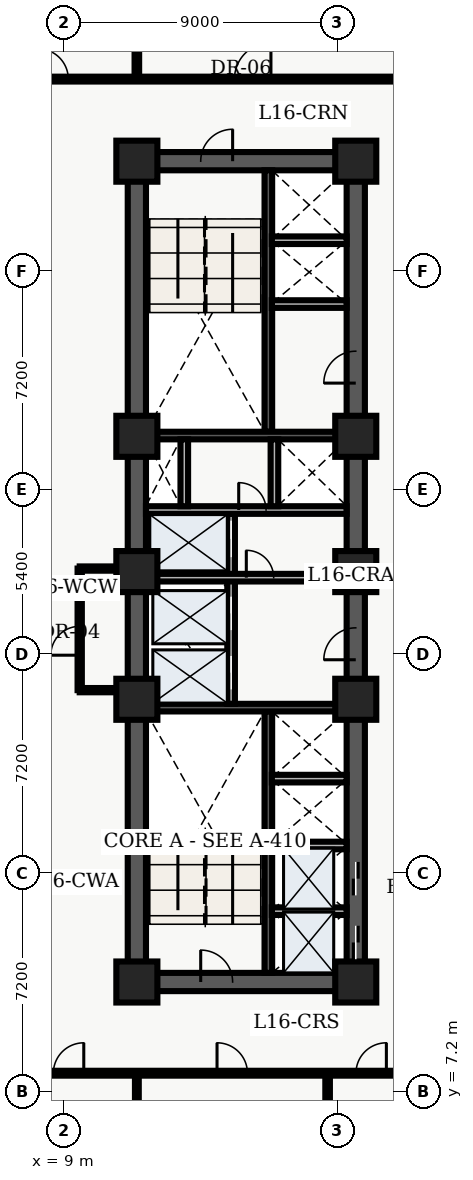
"""IFC4 building model, lengths in metres.
Left out: names, types, materials, properties, quantities, classifications, styles, units other than length and angle.
Written with IfcOpenShell. Run it as: python <this file> out.ifc"""

import sys

from ifc_helpers import new_model, entity, si_unit, converted_unit, direction, frame, origin_with_axes, origin_2d_with_axis, place, context, subcontext, project, spatial, polyline, rectangle, outline, extrude, element, fill, save


model = new_model("IFC4")
c1 = context("Model", 3, precision=1e-05, world=origin_with_axes(), true_north=direction((0.0, 1.0)))
c2 = subcontext(c1, "Body", "Model", "MODEL_VIEW")
j1 = project(units=[si_unit("LENGTHUNIT", "METRE"), converted_unit("PLANEANGLEUNIT", "DEGREE", entity("IfcPlaneAngleMeasure", 0.017), si_unit("PLANEANGLEUNIT", "RADIAN"), dimensions=[0, 0, 0, 0, 0, 0, 0])], contexts=[c1])
p1 = place(None, origin_with_axes())
s1 = spatial("IfcSite", under=j1, at=p1, CompositionType="ELEMENT")
p2 = place(p1, origin_with_axes())
s2 = spatial("IfcBuilding", under=s1, at=p2, CompositionType="ELEMENT")
p3 = place(p2, frame((0.0, 0.0, 67.8), z_axis=(0.0, 0.0, 1.0), x_axis=(1.0, 0.0, 0.0)))
s3 = spatial("IfcBuildingStorey", under=s2, at=p3, CompositionType="ELEMENT", Elevation=67.8)
p4 = place(p3, frame((11.4, 10.8, 0.0), z_axis=(0.0, 0.0, 1.0), x_axis=(0.0, 1.0, 0.0)))
e1 = element("IfcWall", 1, at=p4, inside=s3, PredefinedType="SHEAR", context=c2, shape_type="SweptSolid", body=[
    extrude(outline(polyline([(0.0, -0.3), (27.0, -0.3), (27.0, 0.3), (0.0, 0.3), (0.0, -0.3)])), origin_with_axes(), (0.0, 0.0, 1.0), 3.66),
])
p5 = place(p3, frame((11.4, 10.8, 0.0), z_axis=(0.0, 0.0, 1.0), x_axis=(1.0, 0.0, 0.0)))
e2 = element("IfcWall", 2, at=p5, inside=s3, PredefinedType="SHEAR", context=c2, shape_type="SweptSolid", body=[
    extrude(outline(polyline([(0.0, -0.3), (7.2, -0.3), (7.2, 0.3), (0.0, 0.3), (0.0, -0.3)])), origin_with_axes(), (0.0, 0.0, 1.0), 3.66),
])
p6 = place(p5, frame((2.625, 0.0, 0.0), z_axis=(0.0, 0.0, 1.0), x_axis=(1.0, 0.0, 0.0)))
e3 = element("IfcOpeningElement", 3, at=p6, cuts=e2, PredefinedType="OPENING", context=c2, shape_type="SweptSolid", body=[
    extrude(rectangle(XDim=1.05, YDim=0.62, at=origin_2d_with_axis()), origin_with_axes(), (0.0, 0.0, 1.0), 2.15),
])
p7 = place(p3, frame((11.4, 37.8, 0.0), z_axis=(0.0, 0.0, 1.0), x_axis=(1.0, 0.0, 0.0)))
e4 = element("IfcWall", 4, at=p7, inside=s3, PredefinedType="SHEAR", context=c2, shape_type="SweptSolid", body=[
    extrude(outline(polyline([(0.0, -0.3), (7.2, -0.3), (7.2, 0.3), (0.0, 0.3), (0.0, -0.3)])), origin_with_axes(), (0.0, 0.0, 1.0), 3.66),
])
p8 = place(p7, frame((2.625, 0.0, 0.0), z_axis=(0.0, 0.0, 1.0), x_axis=(1.0, 0.0, 0.0)))
e5 = element("IfcOpeningElement", 5, at=p8, cuts=e4, PredefinedType="OPENING", context=c2, shape_type="SweptSolid", body=[
    extrude(rectangle(XDim=1.05, YDim=0.62, at=origin_2d_with_axis()), origin_with_axes(), (0.0, 0.0, 1.0), 2.15),
])
p9 = place(p3, frame((18.6, 10.8, 0.0), z_axis=(0.0, 0.0, 1.0), x_axis=(0.0, 1.0, 0.0)))
e6 = element("IfcWall", 6, at=p9, inside=s3, PredefinedType="SHEAR", context=c2, shape_type="SweptSolid", body=[
    extrude(outline(polyline([(0.0, -0.3), (13.5, -0.3), (13.5, 0.3), (0.0, 0.3), (0.0, -0.3)])), origin_with_axes(), (0.0, 0.0, 1.0), 3.66),
])
p10 = place(p9, frame((1.3, 0.0, 0.0), z_axis=(0.0, 0.0, 1.0), x_axis=(1.0, 0.0, 0.0)))
e7 = element("IfcOpeningElement", 7, at=p10, cuts=e6, PredefinedType="OPENING", context=c2, shape_type="SweptSolid", body=[
    extrude(rectangle(XDim=1.1, YDim=0.62, at=origin_2d_with_axis()), origin_with_axes(), (0.0, 0.0, 1.0), 2.15),
])
p11 = place(p9, frame((3.4, 0.0, 0.0), z_axis=(0.0, 0.0, 1.0), x_axis=(1.0, 0.0, 0.0)))
e8 = element("IfcOpeningElement", 8, at=p11, cuts=e6, PredefinedType="OPENING", context=c2, shape_type="SweptSolid", body=[
    extrude(rectangle(XDim=1.1, YDim=0.62, at=origin_2d_with_axis()), origin_with_axes(), (0.0, 0.0, 1.0), 2.15),
])
p12 = place(p9, frame((11.125, 0.0, 0.0), z_axis=(0.0, 0.0, 1.0), x_axis=(1.0, 0.0, 0.0)))
e9 = element("IfcOpeningElement", 9, at=p12, cuts=e6, PredefinedType="OPENING", context=c2, shape_type="SweptSolid", body=[
    extrude(rectangle(XDim=1.05, YDim=0.62, at=origin_2d_with_axis()), origin_with_axes(), (0.0, 0.0, 1.0), 2.15),
])
p13 = place(p3, frame((18.6, 24.3, 0.0), z_axis=(0.0, 0.0, 1.0), x_axis=(0.0, 1.0, 0.0)))
e10 = element("IfcWall", 10, at=p13, inside=s3, PredefinedType="SHEAR", context=c2, shape_type="SweptSolid", body=[
    extrude(outline(polyline([(0.0, -0.3), (13.5, -0.3), (13.5, 0.3), (0.0, 0.3), (0.0, -0.3)])), origin_with_axes(), (0.0, 0.0, 1.0), 3.66),
])
p14 = place(p13, frame((6.725, 0.0, 0.0), z_axis=(0.0, 0.0, 1.0), x_axis=(1.0, 0.0, 0.0)))
e11 = element("IfcOpeningElement", 11, at=p14, cuts=e10, PredefinedType="OPENING", context=c2, shape_type="SweptSolid", body=[
    extrude(rectangle(XDim=1.05, YDim=0.62, at=origin_2d_with_axis()), origin_with_axes(), (0.0, 0.0, 1.0), 2.15),
])
p15 = place(p3, frame((15.725, 11.1, 0.0), z_axis=(0.0, 0.0, 1.0), x_axis=(0.0, 1.0, 0.0)))
e12 = element("IfcWall", 12, at=p15, inside=s3, PredefinedType="SHEAR", context=c2, shape_type="SweptSolid", body=[
    extrude(outline(polyline([(0.0, -0.125), (8.6, -0.125), (8.6, 0.125), (0.0, 0.125), (0.0, -0.125)])), origin_with_axes(), (0.0, 0.0, 1.0), 3.66),
])
p16 = place(p3, frame((11.7, 19.825, 0.0), z_axis=(0.0, 0.0, 1.0), x_axis=(1.0, 0.0, 0.0)))
e13 = element("IfcWall", 13, at=p16, inside=s3, PredefinedType="SHEAR", context=c2, shape_type="SweptSolid", body=[
    extrude(outline(polyline([(0.0, -0.125), (6.6, -0.125), (6.6, 0.125), (0.0, 0.125), (0.0, -0.125)])), origin_with_axes(), (0.0, 0.0, 1.0), 3.66),
])
p17 = place(p3, frame((15.725, 28.9, 0.0), z_axis=(0.0, 0.0, 1.0), x_axis=(0.0, 1.0, 0.0)))
e14 = element("IfcWall", 14, at=p17, inside=s3, PredefinedType="SHEAR", context=c2, shape_type="SweptSolid", body=[
    extrude(outline(polyline([(0.0, -0.125), (8.6, -0.125), (8.6, 0.125), (0.0, 0.125), (0.0, -0.125)])), origin_with_axes(), (0.0, 0.0, 1.0), 3.66),
])
p18 = place(p3, frame((11.7, 28.775, 0.0), z_axis=(0.0, 0.0, 1.0), x_axis=(1.0, 0.0, 0.0)))
e15 = element("IfcWall", 15, at=p18, inside=s3, PredefinedType="SHEAR", context=c2, shape_type="SweptSolid", body=[
    extrude(outline(polyline([(0.0, -0.125), (6.6, -0.125), (6.6, 0.125), (0.0, 0.125), (0.0, -0.125)])), origin_with_axes(), (0.0, 0.0, 1.0), 3.66),
])
p19 = place(p3, frame((14.5, 19.95, 0.0), z_axis=(0.0, 0.0, 1.0), x_axis=(0.0, 1.0, 0.0)))
e16 = element("IfcWall", 16, at=p19, inside=s3, PredefinedType="SOLIDWALL", context=c2, shape_type="SweptSolid", body=[
    extrude(outline(polyline([(0.0, -0.125), (6.25, -0.125), (6.25, 0.125), (0.0, 0.125), (0.0, -0.125)])), origin_with_axes(), (0.0, 0.0, 1.0), 2.7),
])
p20 = place(p19, frame((1.025, 0.0, 0.0), z_axis=(0.0, 0.0, 1.0), x_axis=(1.0, 0.0, 0.0)))
e17 = element("IfcOpeningElement", 17, at=p20, cuts=e16, PredefinedType="OPENING", context=c2, shape_type="SweptSolid", body=[
    extrude(rectangle(XDim=1.1, YDim=0.27, at=origin_2d_with_axis()), origin_with_axes(), (0.0, 0.0, 1.0), 2.15),
])
p21 = place(p19, frame((2.975, 0.0, 0.0), z_axis=(0.0, 0.0, 1.0), x_axis=(1.0, 0.0, 0.0)))
e18 = element("IfcOpeningElement", 18, at=p21, cuts=e16, PredefinedType="OPENING", context=c2, shape_type="SweptSolid", body=[
    extrude(rectangle(XDim=1.1, YDim=0.27, at=origin_2d_with_axis()), origin_with_axes(), (0.0, 0.0, 1.0), 2.15),
])
p22 = place(p19, frame((5.425, 0.0, 0.0), z_axis=(0.0, 0.0, 1.0), x_axis=(1.0, 0.0, 0.0)))
e19 = element("IfcOpeningElement", 19, at=p22, cuts=e16, PredefinedType="OPENING", context=c2, shape_type="SweptSolid", body=[
    extrude(rectangle(XDim=1.2, YDim=0.27, at=origin_2d_with_axis()), origin_with_axes(), (0.0, 0.0, 1.0), 2.15),
])
p23 = place(p3, frame((11.7, 24.1, 0.0), z_axis=(0.0, 0.0, 1.0), x_axis=(1.0, 0.0, 0.0)))
e20 = element("IfcWall", 20, at=p23, inside=s3, PredefinedType="SOLIDWALL", context=c2, shape_type="SweptSolid", body=[
    extrude(outline(polyline([(0.0, -0.125), (6.6, -0.125), (6.6, 0.125), (0.0, 0.125), (0.0, -0.125)])), origin_with_axes(), (0.0, 0.0, 1.0), 2.7),
])
p24 = place(p23, frame((3.75, 0.0, 0.0), z_axis=(0.0, 0.0, 1.0), x_axis=(1.0, 0.0, 0.0)))
e21 = element("IfcOpeningElement", 21, at=p24, cuts=e20, PredefinedType="OPENING", context=c2, shape_type="SweptSolid", body=[
    extrude(rectangle(XDim=0.9, YDim=0.27, at=origin_2d_with_axis()), origin_with_axes(), (0.0, 0.0, 1.0), 2.15),
])
p25 = place(p3, frame((11.7, 26.325, 0.0), z_axis=(0.0, 0.0, 1.0), x_axis=(1.0, 0.0, 0.0)))
e22 = element("IfcWall", 22, at=p25, inside=s3, PredefinedType="SOLIDWALL", context=c2, shape_type="SweptSolid", body=[
    extrude(outline(polyline([(0.0, -0.125), (6.6, -0.125), (6.6, 0.125), (0.0, 0.125), (0.0, -0.125)])), origin_with_axes(), (0.0, 0.0, 1.0), 2.7),
])
p26 = place(p25, frame((3.5, 0.0, 0.0), z_axis=(0.0, 0.0, 1.0), x_axis=(1.0, 0.0, 0.0)))
e23 = element("IfcOpeningElement", 23, at=p26, cuts=e22, PredefinedType="OPENING", context=c2, shape_type="SweptSolid", body=[
    extrude(rectangle(XDim=0.9, YDim=0.27, at=origin_2d_with_axis()), origin_with_axes(), (0.0, 0.0, 1.0), 2.15),
])
for number, where, z_axis, x_axis in (
    (24, (12.96, 26.45, 0.0), (0.0, 0.0, 1.0), (0.0, 1.0, 0.0)),
    (25, (15.925, 26.45, 0.0), (0.0, 0.0, 1.0), (0.0, 1.0, 0.0)),
):
    element("IfcWall", number, at=place(p3, frame(where, z_axis=z_axis, x_axis=x_axis)), inside=s3, PredefinedType="SOLIDWALL", context=c2, shape_type="SweptSolid", body=[
        extrude(outline(polyline([(0.0, -0.125), (2.2, -0.125), (2.2, 0.125), (0.0, 0.125), (0.0, -0.125)])), origin_with_axes(), (0.0, 0.0, 1.0), 2.7),
    ])
for number, where, z_axis, x_axis in (
    (26, (11.4, 10.8, 0.0), (0.0, 0.0, 1.0), (1.0, 0.0, 0.0)),
    (27, (11.4, 20.1, 0.0), (0.0, 0.0, 1.0), (1.0, 0.0, 0.0)),
    (28, (11.4, 24.3, 0.0), (0.0, 0.0, 1.0), (1.0, 0.0, 0.0)),
    (29, (11.4, 28.75, 0.0), (0.0, 0.0, 1.0), (1.0, 0.0, 0.0)),
    (30, (11.4, 37.8, 0.0), (0.0, 0.0, 1.0), (1.0, 0.0, 0.0)),
    (31, (18.6, 10.8, 0.0), (0.0, 0.0, 1.0), (1.0, 0.0, 0.0)),
    (32, (18.6, 20.1, 0.0), (0.0, 0.0, 1.0), (1.0, 0.0, 0.0)),
    (33, (18.6, 24.3, 0.0), (0.0, 0.0, 1.0), (1.0, 0.0, 0.0)),
    (34, (18.6, 28.75, 0.0), (0.0, 0.0, 1.0), (1.0, 0.0, 0.0)),
    (35, (18.6, 37.8, 0.0), (0.0, 0.0, 1.0), (1.0, 0.0, 0.0)),
):
    element("IfcColumn", number, at=place(p3, frame(where, z_axis=z_axis, x_axis=x_axis)), inside=s3, PredefinedType="COLUMN", context=c2, shape_type="SweptSolid", body=[
        extrude(rectangle(XDim=1.35, YDim=1.35, at=origin_2d_with_axis()), origin_with_axes(), (0.0, 0.0, 1.0), 3.9),
    ])
for number, where, z_axis, x_axis in (
    (36, (15.84, 13.13, 0.0), (0.0, 0.0, 1.0), (1.0, 0.0, 0.0)),
    (37, (15.84, 15.29, 0.0), (0.0, 0.0, 1.0), (1.0, 0.0, 0.0)),
    (38, (15.84, 17.49, 0.0), (0.0, 0.0, 1.0), (1.0, 0.0, 0.0)),
    (39, (15.84, 33.1, 0.0), (0.0, 0.0, 1.0), (1.0, 0.0, 0.0)),
    (40, (15.84, 35.2, 0.0), (0.0, 0.0, 1.0), (1.0, 0.0, 0.0)),
):
    element("IfcWall", number, at=place(p3, frame(where, z_axis=z_axis, x_axis=x_axis)), inside=s3, PredefinedType="SOLIDWALL", context=c2, shape_type="SweptSolid", body=[
        extrude(outline(polyline([(0.0, -0.125), (2.46, -0.125), (2.46, 0.125), (0.0, 0.125), (0.0, -0.125)])), origin_with_axes(), (0.0, 0.0, 1.0), 2.7),
    ])
p27 = place(p3, frame((9.52, 20.4, 0.0), z_axis=(0.0, 0.0, 1.0), x_axis=(0.0, 1.0, 0.0)))
e41 = element("IfcWall", 41, at=p27, inside=s3, PredefinedType="PARTITIONING", context=c2, shape_type="SweptSolid", body=[
    extrude(outline(polyline([(0.0, -0.07), (4.0, -0.07), (4.0, 0.07), (0.0, 0.07), (0.0, -0.07)])), origin_with_axes(), (0.0, 0.0, 1.0), 2.7),
])
p28 = place(p27, frame((1.625, 0.0, 0.0), z_axis=(0.0, 0.0, 1.0), x_axis=(1.0, 0.0, 0.0)))
e42 = element("IfcOpeningElement", 42, at=p28, cuts=e41, PredefinedType="OPENING", context=c2, shape_type="SweptSolid", body=[
    extrude(rectangle(XDim=0.95, YDim=0.16, at=origin_2d_with_axis()), origin_with_axes(), (0.0, 0.0, 1.0), 2.15),
])
for number, where, z_axis, x_axis in (
    (43, (9.52, 20.4, 0.0), (0.0, 0.0, 1.0), (1.0, 0.0, 0.0)),
    (44, (9.52, 24.4, 0.0), (0.0, 0.0, 1.0), (1.0, 0.0, 0.0)),
):
    element("IfcWall", number, at=place(p3, frame(where, z_axis=z_axis, x_axis=x_axis)), inside=s3, PredefinedType="PARTITIONING", context=c2, shape_type="SweptSolid", body=[
        extrude(outline(polyline([(0.0, -0.07), (1.58, -0.07), (1.58, 0.07), (0.0, 0.07), (0.0, -0.07)])), origin_with_axes(), (0.0, 0.0, 1.0), 2.7),
    ])
p29 = place(p3, frame((2.6, 7.8, 0.0), z_axis=(0.0, 0.0, 1.0), x_axis=(1.0, 0.0, 0.0)))
e45 = element("IfcWall", 45, at=p29, inside=s3, PredefinedType="PARTITIONING", context=c2, shape_type="SweptSolid", body=[
    extrude(outline(polyline([(0.0, -0.08), (18.55, -0.08), (18.55, 0.08), (0.0, 0.08), (0.0, -0.08)])), origin_with_axes(), (0.0, 0.0, 1.0), 2.7),
])
p30 = place(p29, frame((2.149, 0.0, 0.0), z_axis=(0.0, 0.0, 1.0), x_axis=(1.0, 0.0, 0.0)))
e46 = element("IfcOpeningElement", 46, at=p30, cuts=e45, PredefinedType="OPENING", context=c2, shape_type="SweptSolid", body=[
    extrude(rectangle(XDim=1.0, YDim=0.18, at=origin_2d_with_axis()), origin_with_axes(), (0.0, 0.0, 1.0), 2.15),
])
p31 = place(p29, frame((6.554, 0.0, 0.0), z_axis=(0.0, 0.0, 1.0), x_axis=(1.0, 0.0, 0.0)))
e47 = element("IfcOpeningElement", 47, at=p31, cuts=e45, PredefinedType="OPENING", context=c2, shape_type="SweptSolid", body=[
    extrude(rectangle(XDim=1.0, YDim=0.18, at=origin_2d_with_axis()), origin_with_axes(), (0.0, 0.0, 1.0), 2.15),
])
p32 = place(p29, frame((11.937, 0.0, 0.0), z_axis=(0.0, 0.0, 1.0), x_axis=(1.0, 0.0, 0.0)))
e48 = element("IfcOpeningElement", 48, at=p32, cuts=e45, PredefinedType="OPENING", context=c2, shape_type="SweptSolid", body=[
    extrude(rectangle(XDim=1.0, YDim=0.18, at=origin_2d_with_axis()), origin_with_axes(), (0.0, 0.0, 1.0), 2.15),
])
p33 = place(p29, frame((16.507, 0.0, 0.0), z_axis=(0.0, 0.0, 1.0), x_axis=(1.0, 0.0, 0.0)))
e49 = element("IfcOpeningElement", 49, at=p33, cuts=e45, PredefinedType="OPENING", context=c2, shape_type="SweptSolid", body=[
    extrude(rectangle(XDim=1.0, YDim=0.18, at=origin_2d_with_axis()), origin_with_axes(), (0.0, 0.0, 1.0), 2.15),
])
p34 = place(p3, frame((2.6, 40.5, 0.0), z_axis=(0.0, 0.0, 1.0), x_axis=(1.0, 0.0, 0.0)))
e50 = element("IfcWall", 50, at=p34, inside=s3, PredefinedType="PARTITIONING", context=c2, shape_type="SweptSolid", body=[
    extrude(outline(polyline([(0.0, -0.08), (18.65, -0.08), (18.65, 0.08), (0.0, 0.08), (0.0, -0.08)])), origin_with_axes(), (0.0, 0.0, 1.0), 2.7),
])
p35 = place(p34, frame((6.045, 0.0, 0.0), z_axis=(0.0, 0.0, 1.0), x_axis=(1.0, 0.0, 0.0)))
e51 = element("IfcOpeningElement", 51, at=p35, cuts=e50, PredefinedType="OPENING", context=c2, shape_type="SweptSolid", body=[
    extrude(rectangle(XDim=1.0, YDim=0.18, at=origin_2d_with_axis()), origin_with_axes(), (0.0, 0.0, 1.0), 2.15),
])
p36 = place(p34, frame((12.61, 0.0, 0.0), z_axis=(0.0, 0.0, 1.0), x_axis=(1.0, 0.0, 0.0)))
e52 = element("IfcOpeningElement", 52, at=p36, cuts=e50, PredefinedType="OPENING", context=c2, shape_type="SweptSolid", body=[
    extrude(rectangle(XDim=1.2, YDim=0.18, at=origin_2d_with_axis()), origin_with_axes(), (0.0, 0.0, 1.0), 2.2),
])
p37 = place(p3, frame((11.4, 0.36, 0.0), z_axis=(0.0, 0.0, 1.0), x_axis=(0.0, 1.0, 0.0)))
e53 = element("IfcWall", 53, at=p37, inside=s3, PredefinedType="PARTITIONING", context=c2, shape_type="SweptSolid", body=[
    extrude(outline(polyline([(0.0, -0.062), (7.34, -0.062), (7.34, 0.062), (0.0, 0.062), (0.0, -0.062)])), origin_with_axes(), (0.0, 0.0, 1.0), 2.7),
])
p38 = place(p3, frame((17.674, 0.36, 0.0), z_axis=(0.0, 0.0, 1.0), x_axis=(0.0, 1.0, 0.0)))
e54 = element("IfcWall", 54, at=p38, inside=s3, PredefinedType="PARTITIONING", context=c2, shape_type="SweptSolid", body=[
    extrude(outline(polyline([(0.0, -0.075), (7.34, -0.075), (7.34, 0.075), (0.0, 0.075), (0.0, -0.075)])), origin_with_axes(), (0.0, 0.0, 1.0), 2.7),
])
p39 = place(p3, frame((11.4, 40.6, 0.0), z_axis=(0.0, 0.0, 1.0), x_axis=(0.0, 1.0, 0.0)))
e55 = element("IfcWall", 55, at=p39, inside=s3, PredefinedType="PARTITIONING", context=c2, shape_type="SweptSolid", body=[
    extrude(outline(polyline([(0.0, -0.075), (7.64, -0.075), (7.64, 0.075), (0.0, 0.075), (0.0, -0.075)])), origin_with_axes(), (0.0, 0.0, 1.0), 2.7),
])
p40 = place(p9, frame((1.3, 0.0, 0.0), z_axis=(0.0, 0.0, 1.0), x_axis=(1.0, 0.0, 0.0)))
e56 = element("IfcDoor", 56, at=p40, inside=s3, OperationType="SLIDING_TO_LEFT", PredefinedType="DOOR", context=c2, shape_type="SweptSolid", body=[
    extrude(rectangle(XDim=1.1, YDim=0.09, at=origin_2d_with_axis()), origin_with_axes(), (0.0, 0.0, 1.0), 2.15),
])
fill(e7, e56)
p41 = place(p9, frame((3.4, 0.0, 0.0), z_axis=(0.0, 0.0, 1.0), x_axis=(1.0, 0.0, 0.0)))
e57 = element("IfcDoor", 57, at=p41, inside=s3, OperationType="SLIDING_TO_RIGHT", PredefinedType="DOOR", context=c2, shape_type="SweptSolid", body=[
    extrude(rectangle(XDim=1.1, YDim=0.09, at=origin_2d_with_axis()), origin_with_axes(), (0.0, 0.0, 1.0), 2.15),
])
fill(e8, e57)
p42 = place(p19, frame((1.025, 0.0, 0.0), z_axis=(0.0, 0.0, 1.0), x_axis=(1.0, 0.0, 0.0)))
e58 = element("IfcDoor", 58, at=p42, inside=s3, OperationType="SLIDING_TO_LEFT", PredefinedType="DOOR", context=c2, shape_type="SweptSolid", body=[
    extrude(rectangle(XDim=1.1, YDim=0.09, at=origin_2d_with_axis()), origin_with_axes(), (0.0, 0.0, 1.0), 2.15),
])
fill(e17, e58)
p43 = place(p19, frame((2.975, 0.0, 0.0), z_axis=(0.0, 0.0, 1.0), x_axis=(1.0, 0.0, 0.0)))
e59 = element("IfcDoor", 59, at=p43, inside=s3, OperationType="SLIDING_TO_RIGHT", PredefinedType="DOOR", context=c2, shape_type="SweptSolid", body=[
    extrude(rectangle(XDim=1.1, YDim=0.09, at=origin_2d_with_axis()), origin_with_axes(), (0.0, 0.0, 1.0), 2.15),
])
fill(e18, e59)
p44 = place(p19, frame((5.425, 0.0, 0.0), z_axis=(0.0, 0.0, 1.0), x_axis=(1.0, 0.0, 0.0)))
e60 = element("IfcDoor", 60, at=p44, inside=s3, OperationType="DOUBLE_DOOR_SLIDING", PredefinedType="DOOR", context=c2, shape_type="SweptSolid", body=[
    extrude(rectangle(XDim=1.2, YDim=0.09, at=origin_2d_with_axis()), origin_with_axes(), (0.0, 0.0, 1.0), 2.15),
])
fill(e19, e60)
p45 = place(p5, frame((2.625, 0.0, 0.0), z_axis=(0.0, 0.0, 1.0), x_axis=(1.0, 0.0, 0.0)))
e61 = element("IfcDoor", 61, at=p45, inside=s3, OperationType="SINGLE_SWING_LEFT", PredefinedType="DOOR", context=c2, shape_type="SweptSolid", body=[
    extrude(rectangle(XDim=1.05, YDim=0.09, at=origin_2d_with_axis()), origin_with_axes(), (0.0, 0.0, 1.0), 2.15),
])
fill(e3, e61)
p46 = place(p7, frame((2.625, 0.0, 0.0), z_axis=(0.0, 0.0, 1.0), x_axis=(1.0, 0.0, 0.0)))
e62 = element("IfcDoor", 62, at=p46, inside=s3, OperationType="SINGLE_SWING_RIGHT", PredefinedType="DOOR", context=c2, shape_type="SweptSolid", body=[
    extrude(rectangle(XDim=1.05, YDim=0.09, at=origin_2d_with_axis()), origin_with_axes(), (0.0, 0.0, 1.0), 2.15),
])
fill(e5, e62)
p47 = place(p9, frame((11.125, 0.0, 0.0), z_axis=(0.0, 0.0, 1.0), x_axis=(1.0, 0.0, 0.0)))
e63 = element("IfcDoor", 63, at=p47, inside=s3, OperationType="SINGLE_SWING_LEFT", PredefinedType="DOOR", context=c2, shape_type="SweptSolid", body=[
    extrude(rectangle(XDim=1.05, YDim=0.09, at=origin_2d_with_axis()), origin_with_axes(), (0.0, 0.0, 1.0), 2.15),
])
fill(e9, e63)
p48 = place(p23, frame((3.75, 0.0, 0.0), z_axis=(0.0, 0.0, 1.0), x_axis=(1.0, 0.0, 0.0)))
e64 = element("IfcDoor", 64, at=p48, inside=s3, OperationType="SINGLE_SWING_LEFT", PredefinedType="DOOR", context=c2, shape_type="SweptSolid", body=[
    extrude(rectangle(XDim=0.9, YDim=0.09, at=origin_2d_with_axis()), origin_with_axes(), (0.0, 0.0, 1.0), 2.15),
])
fill(e21, e64)
p49 = place(p25, frame((3.5, 0.0, 0.0), z_axis=(0.0, 0.0, 1.0), x_axis=(1.0, 0.0, 0.0)))
e65 = element("IfcDoor", 65, at=p49, inside=s3, OperationType="SINGLE_SWING_LEFT", PredefinedType="DOOR", context=c2, shape_type="SweptSolid", body=[
    extrude(rectangle(XDim=0.9, YDim=0.09, at=origin_2d_with_axis()), origin_with_axes(), (0.0, 0.0, 1.0), 2.15),
])
fill(e23, e65)
p50 = place(p13, frame((6.725, 0.0, 0.0), z_axis=(0.0, 0.0, 1.0), x_axis=(1.0, 0.0, 0.0)))
e66 = element("IfcDoor", 66, at=p50, inside=s3, OperationType="SINGLE_SWING_LEFT", PredefinedType="DOOR", context=c2, shape_type="SweptSolid", body=[
    extrude(rectangle(XDim=1.05, YDim=0.09, at=origin_2d_with_axis()), origin_with_axes(), (0.0, 0.0, 1.0), 2.15),
])
fill(e11, e66)
p51 = place(p27, frame((1.625, 0.0, 0.0), z_axis=(0.0, 0.0, 1.0), x_axis=(1.0, 0.0, 0.0)))
e67 = element("IfcDoor", 67, at=p51, inside=s3, OperationType="SINGLE_SWING_LEFT", PredefinedType="DOOR", context=c2, shape_type="SweptSolid", body=[
    extrude(rectangle(XDim=0.95, YDim=0.084, at=origin_2d_with_axis()), origin_with_axes(), (0.0, 0.0, 1.0), 2.15),
])
fill(e42, e67)
p52 = place(p29, frame((6.554, 0.0, 0.0), z_axis=(0.0, 0.0, 1.0), x_axis=(1.0, 0.0, 0.0)))
e68 = element("IfcDoor", 68, at=p52, inside=s3, OperationType="SINGLE_SWING_RIGHT", PredefinedType="DOOR", context=c2, shape_type="SweptSolid", body=[
    extrude(rectangle(XDim=1.0, YDim=0.09, at=origin_2d_with_axis()), origin_with_axes(), (0.0, 0.0, 1.0), 2.15),
])
fill(e47, e68)
p53 = place(p29, frame((11.937, 0.0, 0.0), z_axis=(0.0, 0.0, 1.0), x_axis=(1.0, 0.0, 0.0)))
e69 = element("IfcDoor", 69, at=p53, inside=s3, OperationType="SINGLE_SWING_LEFT", PredefinedType="DOOR", context=c2, shape_type="SweptSolid", body=[
    extrude(rectangle(XDim=1.0, YDim=0.09, at=origin_2d_with_axis()), origin_with_axes(), (0.0, 0.0, 1.0), 2.15),
])
fill(e48, e69)
p54 = place(p29, frame((16.507, 0.0, 0.0), z_axis=(0.0, 0.0, 1.0), x_axis=(1.0, 0.0, 0.0)))
e70 = element("IfcDoor", 70, at=p54, inside=s3, OperationType="SINGLE_SWING_RIGHT", PredefinedType="DOOR", context=c2, shape_type="SweptSolid", body=[
    extrude(rectangle(XDim=1.0, YDim=0.09, at=origin_2d_with_axis()), origin_with_axes(), (0.0, 0.0, 1.0), 2.15),
])
fill(e49, e70)
p55 = place(p34, frame((6.045, 0.0, 0.0), z_axis=(0.0, 0.0, 1.0), x_axis=(1.0, 0.0, 0.0)))
e71 = element("IfcDoor", 71, at=p55, inside=s3, OperationType="SINGLE_SWING_LEFT", PredefinedType="DOOR", context=c2, shape_type="SweptSolid", body=[
    extrude(rectangle(XDim=1.0, YDim=0.09, at=origin_2d_with_axis()), origin_with_axes(), (0.0, 0.0, 1.0), 2.15),
])
fill(e51, e71)
p56 = place(p34, frame((12.61, 0.0, 0.0), z_axis=(0.0, 0.0, 1.0), x_axis=(1.0, 0.0, 0.0)))
e72 = element("IfcDoor", 72, at=p56, inside=s3, OperationType="SINGLE_SWING_RIGHT", PredefinedType="DOOR", context=c2, shape_type="SweptSolid", body=[
    extrude(rectangle(XDim=1.2, YDim=0.09, at=origin_2d_with_axis()), origin_with_axes(), (0.0, 0.0, 1.0), 2.2),
])
fill(e52, e72)
save(model, sys.argv[1])
